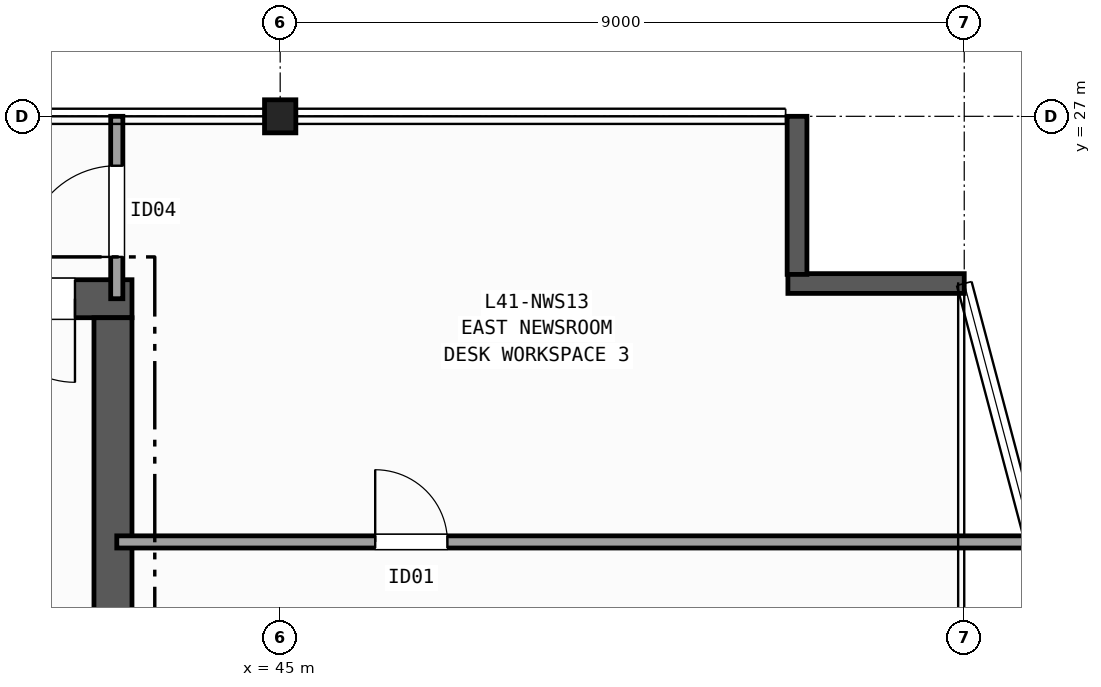
"""IFC4 building model, lengths in metres.
Left out: names, types, materials, properties, quantities, classifications, styles, units other than length and angle.
Written with IfcOpenShell. Run it as: python <this file> out.ifc"""

import sys

from ifc_helpers import new_model, si_unit, direction, frame, frame_2d, origin, origin_2d, place, context, subcontext, project, spatial, rectangle, i_section, extrude, element, fill, save


model = new_model("IFC4")
c1 = context("Model", 3, precision=1e-05, world=origin(), true_north=direction((0.0, 1.0)))
c2 = subcontext(c1, "Body", "Model", "MODEL_VIEW")
j1 = project(units=[si_unit("LENGTHUNIT", "METRE"), si_unit("PLANEANGLEUNIT", "RADIAN")], contexts=[c1])
p1 = place(None, origin())
s1 = spatial("IfcSite", under=j1, at=p1, CompositionType="ELEMENT")
p2 = place(p1, origin())
s2 = spatial("IfcBuilding", under=s1, at=p2, CompositionType="ELEMENT")
p3 = place(p2, frame((0.0, 0.0, 165.5)))
s3 = spatial("IfcBuildingStorey", under=s2, at=p3, CompositionType="ELEMENT", Elevation=165.5)
p4 = place(p3, frame((45.0, 27.0, 0.0), z_axis=(0.0, 0.0, 1.0), x_axis=(1.0, 0.0, 0.0)))
e1 = element("IfcColumn", 1, at=p4, inside=s3, PredefinedType="COLUMN", context=c2, shape_type="SweptSolid", body=[
    extrude(i_section(OverallWidth=0.412, OverallDepth=0.435, WebThickness=0.036, FlangeThickness=0.057, FilletRadius=0.015, at=origin_2d()), origin(), (0.0, 0.0, 1.0), 3.7),
])
p5 = place(p3, frame((54.0, 24.8, 0.0), z_axis=(0.0, 0.0, 1.0), x_axis=(-1.0, 0.0, 0.0)))
e2 = element("IfcWall", 2, at=p5, inside=s3, PredefinedType="SOLIDWALL", context=c2, shape_type="SweptSolid", body=[
    extrude(rectangle(XDim=2.32, YDim=0.26, at=frame_2d((1.16, 0.0))), origin(), (0.0, 0.0, 1.0), 3.37),
])
p6 = place(p3, frame((51.8, 24.92, 0.0), z_axis=(0.0, 0.0, 1.0), x_axis=(0.0, 1.0, 0.0)))
e3 = element("IfcWall", 3, at=p6, inside=s3, PredefinedType="SOLIDWALL", context=c2, shape_type="SweptSolid", body=[
    extrude(rectangle(XDim=2.08, YDim=0.26, at=frame_2d((1.04, 0.0))), origin(), (0.0, 0.0, 1.0), 3.37),
])
p7 = place(p3, frame((43.05, 24.6, 0.0), z_axis=(0.0, 0.0, 1.0), x_axis=(-1.0, 0.0, 0.0)))
e4 = element("IfcWall", 4, at=p7, inside=s3, PredefinedType="SHEAR", context=c2, shape_type="SweptSolid", body=[
    extrude(rectangle(XDim=13.9, YDim=0.5, at=frame_2d((6.95, 0.0))), origin(), (0.0, 0.0, 1.0), 3.37),
])
p8 = place(p7, frame((0.75, 0.0, 0.0)))
e5 = element("IfcOpeningElement", 5, at=p8, cuts=e4, PredefinedType="OPENING", context=c2, shape_type="SweptSolid", body=[
    extrude(rectangle(XDim=1.1, YDim=2.15, at=frame_2d((0.55, 1.075))), frame((0.0, 0.26, 0.0), z_axis=(0.0, -1.0, 0.0), x_axis=(1.0, 0.0, 0.0)), (0.0, 0.0, 1.0), 0.52),
])
p9 = place(p7, frame((2.25, 0.0, 0.0)))
e6 = element("IfcOpeningElement", 6, at=p9, cuts=e4, PredefinedType="OPENING", context=c2, shape_type="SweptSolid", body=[
    extrude(rectangle(XDim=0.9, YDim=2.1, at=frame_2d((0.45, 1.05))), frame((0.0, 0.26, 0.0), z_axis=(0.0, -1.0, 0.0), x_axis=(1.0, 0.0, 0.0)), (0.0, 0.0, 1.0), 0.52),
])
p10 = place(p7, frame((3.55, 0.0, 0.0)))
e7 = element("IfcOpeningElement", 7, at=p10, cuts=e4, PredefinedType="OPENING", context=c2, shape_type="SweptSolid", body=[
    extrude(rectangle(XDim=0.9, YDim=2.1, at=frame_2d((0.45, 1.05))), frame((0.0, 0.26, 0.0), z_axis=(0.0, -1.0, 0.0), x_axis=(1.0, 0.0, 0.0)), (0.0, 0.0, 1.0), 0.52),
])
p11 = place(p7, frame((4.9, 0.0, 0.0)))
e8 = element("IfcOpeningElement", 8, at=p11, cuts=e4, PredefinedType="OPENING", context=c2, shape_type="SweptSolid", body=[
    extrude(rectangle(XDim=0.9, YDim=2.1, at=frame_2d((0.45, 1.05))), frame((0.0, 0.26, 0.0), z_axis=(0.0, -1.0, 0.0), x_axis=(1.0, 0.0, 0.0)), (0.0, 0.0, 1.0), 0.52),
])
p12 = place(p3, frame((42.8, 11.45, 0.0), z_axis=(0.0, 0.0, 1.0), x_axis=(0.0, 1.0, 0.0)))
e9 = element("IfcWall", 9, at=p12, inside=s3, PredefinedType="SHEAR", context=c2, shape_type="SweptSolid", body=[
    extrude(rectangle(XDim=12.9, YDim=0.5, at=frame_2d((6.45, 0.0))), origin(), (0.0, 0.0, 1.0), 3.37),
])
p13 = place(p3, frame((42.85, 24.6, 0.0), z_axis=(0.0, 0.0, 1.0), x_axis=(0.0, 1.0, 0.0)))
e10 = element("IfcWall", 10, at=p13, inside=s3, PredefinedType="PARTITIONING", context=c2, shape_type="SweptSolid", body=[
    extrude(rectangle(XDim=2.4, YDim=0.16, at=frame_2d((1.2, 0.0))), origin(), (0.0, 0.0, 1.0), 2.584),
])
p14 = place(p13, frame((0.55, 0.0, 0.0)))
e11 = element("IfcOpeningElement", 11, at=p14, cuts=e10, PredefinedType="OPENING", context=c2, shape_type="SweptSolid", body=[
    extrude(rectangle(XDim=1.2, YDim=2.15, at=frame_2d((0.6, 1.075))), frame((0.0, 0.09, 0.0), z_axis=(0.0, -1.0, 0.0), x_axis=(1.0, 0.0, 0.0)), (0.0, 0.0, 1.0), 0.18),
])
p15 = place(p3, frame((42.85, 21.4, 0.0), z_axis=(0.0, 0.0, 1.0), x_axis=(1.0, 0.0, 0.0)))
e12 = element("IfcWall", 12, at=p15, inside=s3, PredefinedType="PARTITIONING", context=c2, shape_type="SweptSolid", body=[
    extrude(rectangle(XDim=12.05, YDim=0.16, at=frame_2d((6.025, 0.0))), origin(), (0.0, 0.0, 1.0), 2.742),
])
p16 = place(p15, frame((3.4, 0.0, 0.0)))
e13 = element("IfcOpeningElement", 13, at=p16, cuts=e12, PredefinedType="OPENING", context=c2, shape_type="SweptSolid", body=[
    extrude(rectangle(XDim=0.95, YDim=2.1, at=frame_2d((0.475, 1.05))), frame((0.0, 0.09, 0.0), z_axis=(0.0, -1.0, 0.0), x_axis=(1.0, 0.0, 0.0)), (0.0, 0.0, 1.0), 0.18),
])
p17 = place(p8, origin())
e14 = element("IfcDoor", 14, at=p17, inside=s3, OperationType="SINGLE_SWING_LEFT", PredefinedType="DOOR", context=c2, shape_type="SweptSolid", body=[
    extrude(rectangle(XDim=1.1, YDim=2.15, at=frame_2d((0.55, 1.075))), frame((0.0, 0.025, 0.0), z_axis=(0.0, -1.0, 0.0), x_axis=(1.0, 0.0, 0.0)), (0.0, 0.0, 1.0), 0.05),
])
fill(e5, e14)
p18 = place(p14, origin())
e15 = element("IfcDoor", 15, at=p18, inside=s3, OperationType="SINGLE_SWING_LEFT", PredefinedType="DOOR", context=c2, shape_type="SweptSolid", body=[
    extrude(rectangle(XDim=1.2, YDim=2.15, at=frame_2d((0.6, 1.075))), frame((0.0, 0.025, 0.0), z_axis=(0.0, -1.0, 0.0), x_axis=(1.0, 0.0, 0.0)), (0.0, 0.0, 1.0), 0.05),
])
fill(e11, e15)
p19 = place(p16, origin())
e16 = element("IfcDoor", 16, at=p19, inside=s3, OperationType="SINGLE_SWING_LEFT", PredefinedType="DOOR", context=c2, shape_type="SweptSolid", body=[
    extrude(rectangle(XDim=0.95, YDim=2.1, at=frame_2d((0.475, 1.05))), frame((0.0, 0.025, 0.0), z_axis=(0.0, -1.0, 0.0), x_axis=(1.0, 0.0, 0.0)), (0.0, 0.0, 1.0), 0.05),
])
fill(e13, e16)
save(model, sys.argv[1])
